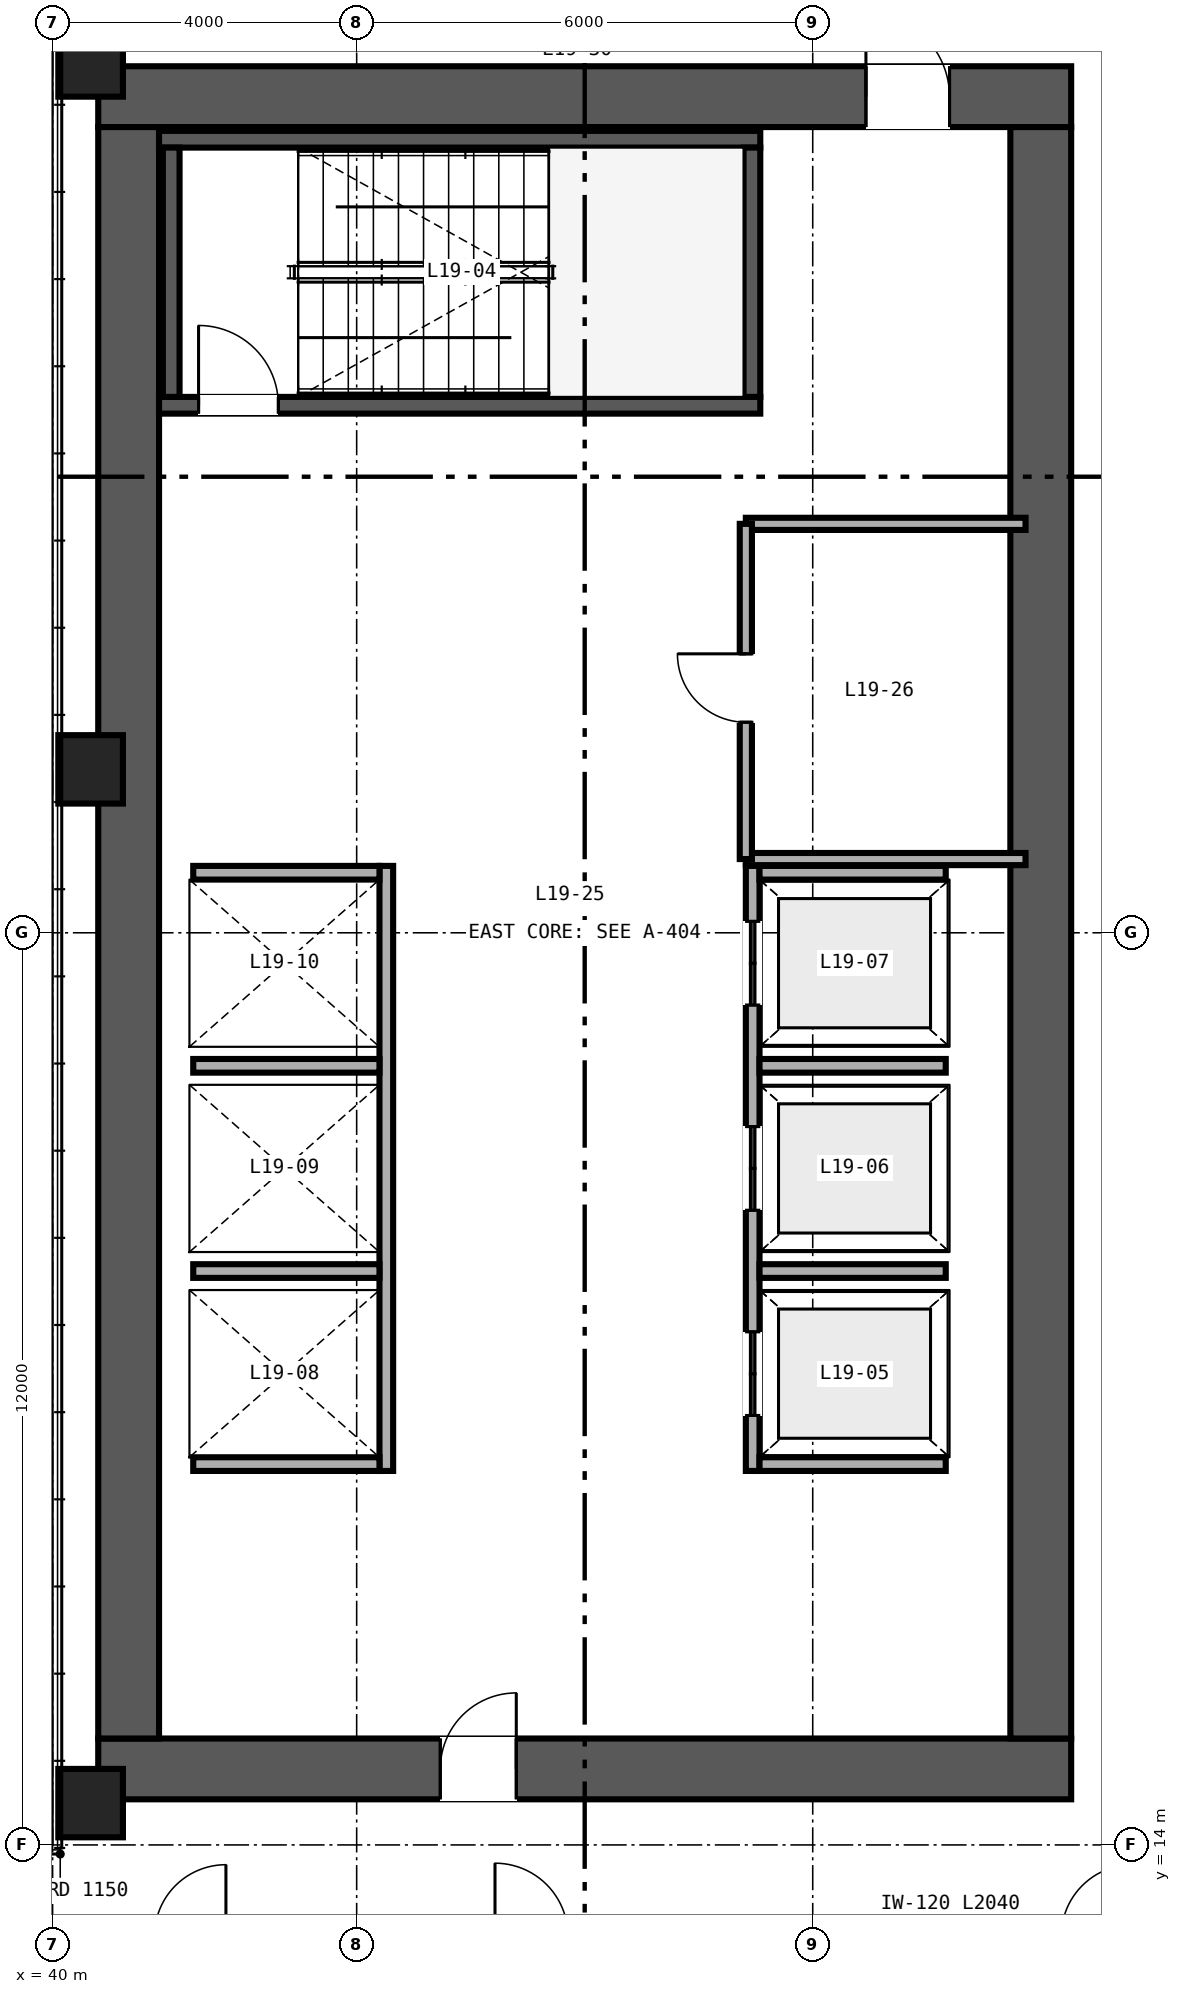
"""IFC4 building model, lengths in metres.
Left out: names, types, materials, properties, quantities, classifications, styles, units other than length and angle.
Written with IfcOpenShell. Run it as: python <this file> out.ifc"""

import sys

from ifc_helpers import new_model, si_unit, direction, frame, frame_2d, origin, origin_2d, place, context, subcontext, project, spatial, rectangle, hollow_rectangle, extrude, source, transform, mapped, element, fill, save


model = new_model("IFC4")
c1 = context("Model", 3, precision=1e-05, world=origin(), true_north=direction((0.0, 1.0)))
c2 = subcontext(c1, "Body", "Model", "MODEL_VIEW")
j1 = project(units=[si_unit("LENGTHUNIT", "METRE"), si_unit("PLANEANGLEUNIT", "RADIAN")], contexts=[c1])
p1 = place(None, origin())
s1 = spatial("IfcSite", under=j1, at=p1, CompositionType="ELEMENT")
p2 = place(p1, origin())
s2 = spatial("IfcBuilding", under=s1, at=p2, CompositionType="ELEMENT")
p3 = place(p2, frame((0.0, 0.0, 78.0)))
s3 = spatial("IfcBuildingStorey", under=s2, at=p3, CompositionType="ELEMENT", Elevation=78.0)
p4 = place(p3, frame((40.6, 15.0, 0.0), z_axis=(0.0, 0.0, 1.0), x_axis=(1.0, 0.0, 0.0)))
e1 = element("IfcWall", 1, at=p4, inside=s3, PredefinedType="SHEAR", context=c2, shape_type="SweptSolid", body=[
    extrude(rectangle(XDim=12.8, YDim=0.8, at=frame_2d((6.4, 0.0))), origin(), (0.0, 0.0, 1.0), 3.35),
])
p5 = place(p4, frame((4.5, 0.0, 0.0)))
e2 = element("IfcOpeningElement", 2, at=p5, cuts=e1, PredefinedType="OPENING", context=c2, shape_type="SweptSolid", body=[
    extrude(rectangle(XDim=1.0, YDim=2.15, at=frame_2d((0.5, 1.075))), frame((0.0, 0.41, 0.0), z_axis=(0.0, -1.0, 0.0), x_axis=(1.0, 0.0, 0.0)), (0.0, 0.0, 1.0), 0.82),
])
p6 = place(p3, frame((40.6, 37.0, 0.0), z_axis=(0.0, 0.0, 1.0), x_axis=(1.0, 0.0, 0.0)))
e3 = element("IfcWall", 3, at=p6, inside=s3, PredefinedType="SHEAR", context=c2, shape_type="SweptSolid", body=[
    extrude(rectangle(XDim=12.8, YDim=0.8, at=frame_2d((6.4, 0.0))), origin(), (0.0, 0.0, 1.0), 3.35),
])
p7 = place(p6, frame((10.1, 0.0, 0.0)))
e4 = element("IfcOpeningElement", 4, at=p7, cuts=e3, PredefinedType="OPENING", context=c2, shape_type="SweptSolid", body=[
    extrude(rectangle(XDim=1.1, YDim=2.15, at=frame_2d((0.55, 1.075))), frame((0.0, 0.41, 0.0), z_axis=(0.0, -1.0, 0.0), x_axis=(1.0, 0.0, 0.0)), (0.0, 0.0, 1.0), 0.82),
])
for number, where, z_axis, x_axis in (
    (5, (41.0, 15.4, 0.0), (0.0, 0.0, 1.0), (0.0, 1.0, 0.0)),
    (6, (53.0, 15.4, 0.0), (0.0, 0.0, 1.0), (0.0, 1.0, 0.0)),
):
    element("IfcWall", number, at=place(p3, frame(where, z_axis=z_axis, x_axis=x_axis)), inside=s3, PredefinedType="SHEAR", context=c2, shape_type="SweptSolid", body=[
        extrude(rectangle(XDim=21.2, YDim=0.8, at=frame_2d((10.6, 0.0))), origin(), (0.0, 0.0, 1.0), 3.35),
    ])
p8 = place(p3, frame((41.4, 32.94, 0.0), z_axis=(0.0, 0.0, 1.0), x_axis=(1.0, 0.0, 0.0)))
e7 = element("IfcWall", 7, at=p8, inside=s3, PredefinedType="SHEAR", context=c2, shape_type="SweptSolid", body=[
    extrude(rectangle(XDim=7.91, YDim=0.22, at=frame_2d((3.955, 0.0))), origin(), (0.0, 0.0, 1.0), 3.4),
])
p9 = place(p8, frame((0.52, 0.0, 0.0)))
e8 = element("IfcOpeningElement", 8, at=p9, cuts=e7, PredefinedType="OPENING", context=c2, shape_type="SweptSolid", body=[
    extrude(rectangle(XDim=1.05, YDim=2.15, at=frame_2d((0.525, 1.075))), frame((0.0, 0.12, 0.0), z_axis=(0.0, -1.0, 0.0), x_axis=(1.0, 0.0, 0.0)), (0.0, 0.0, 1.0), 0.24),
])
p10 = place(p3, frame((41.4, 36.44, 0.0), z_axis=(0.0, 0.0, 1.0), x_axis=(1.0, 0.0, 0.0)))
e9 = element("IfcWall", 9, at=p10, inside=s3, PredefinedType="SHEAR", context=c2, shape_type="SweptSolid", body=[
    extrude(rectangle(XDim=7.91, YDim=0.22, at=frame_2d((3.955, 0.0))), origin(), (0.0, 0.0, 1.0), 3.4),
])
for number, where, z_axis, x_axis in (
    (10, (41.56, 33.05, 0.0), (0.0, 0.0, 1.0), (0.0, 1.0, 0.0)),
    (11, (49.2, 33.05, 0.0), (0.0, 0.0, 1.0), (0.0, 1.0, 0.0)),
):
    element("IfcWall", number, at=place(p3, frame(where, z_axis=z_axis, x_axis=x_axis)), inside=s3, PredefinedType="SHEAR", context=c2, shape_type="SweptSolid", body=[
        extrude(rectangle(XDim=3.28, YDim=0.22, at=frame_2d((1.64, 0.0))), origin(), (0.0, 0.0, 1.0), 3.4),
    ])
m1 = source(origin(), c2, "Body", "SweptSolid", [
    extrude(hollow_rectangle(XDim=0.85, YDim=0.9, WallThickness=0.04, at=origin_2d()), origin(), (0.0, 0.0, 1.0), 3.35),
])
for number, where, z_axis, x_axis in (
    (12, (40.5, 14.55, 0.0), (0.0, 0.0, 1.0), (1.0, 0.0, 0.0)),
    (13, (40.5, 28.15, 0.0), (0.0, 0.0, 1.0), (1.0, 0.0, 0.0)),
    (14, (40.5, 37.45, 0.0), (0.0, 0.0, 1.0), (1.0, 0.0, 0.0)),
):
    element("IfcColumn", number, at=place(p3, frame(where, z_axis=z_axis, x_axis=x_axis)), inside=s3, PredefinedType="COLUMN", context=c2, shape_type="MappedRepresentation", body=[
        mapped(m1, transform((0.0, 0.0, 0.0), scale=1.0)),
    ])
p11 = place(p3, frame((49.21, 18.92, 0.0), z_axis=(0.0, 0.0, 1.0), x_axis=(0.0, 1.0, 0.0)))
e15 = element("IfcWall", 15, at=p11, inside=s3, PredefinedType="SOLIDWALL", context=c2, shape_type="SweptSolid", body=[
    extrude(rectangle(XDim=7.96, YDim=0.18, at=frame_2d((3.98, 0.0))), origin(), (0.0, 0.0, 1.0), 3.35),
])
p12 = place(p11, frame((0.73, 0.0, 0.0)))
e16 = element("IfcOpeningElement", 16, at=p12, cuts=e15, PredefinedType="OPENING", context=c2, shape_type="SweptSolid", body=[
    extrude(rectangle(XDim=1.1, YDim=2.2, at=frame_2d((0.55, 1.1))), frame((0.0, 0.1, 0.0), z_axis=(0.0, -1.0, 0.0), x_axis=(1.0, 0.0, 0.0)), (0.0, 0.0, 1.0), 0.2),
])
p13 = place(p11, frame((3.43, 0.0, 0.0)))
e17 = element("IfcOpeningElement", 17, at=p13, cuts=e15, PredefinedType="OPENING", context=c2, shape_type="SweptSolid", body=[
    extrude(rectangle(XDim=1.1, YDim=2.2, at=frame_2d((0.55, 1.1))), frame((0.0, 0.1, 0.0), z_axis=(0.0, -1.0, 0.0), x_axis=(1.0, 0.0, 0.0)), (0.0, 0.0, 1.0), 0.2),
])
p14 = place(p11, frame((6.13, 0.0, 0.0)))
e18 = element("IfcOpeningElement", 18, at=p14, cuts=e15, PredefinedType="OPENING", context=c2, shape_type="SweptSolid", body=[
    extrude(rectangle(XDim=1.1, YDim=2.2, at=frame_2d((0.55, 1.1))), frame((0.0, 0.1, 0.0), z_axis=(0.0, -1.0, 0.0), x_axis=(1.0, 0.0, 0.0)), (0.0, 0.0, 1.0), 0.2),
])
for number, where, z_axis, x_axis in (
    (19, (49.3, 19.01, 0.0), (0.0, 0.0, 1.0), (1.0, 0.0, 0.0)),
    (20, (49.3, 26.79, 0.0), (0.0, 0.0, 1.0), (1.0, 0.0, 0.0)),
    (21, (49.3, 21.55, 0.0), (0.0, 0.0, 1.0), (1.0, 0.0, 0.0)),
    (22, (49.3, 24.25, 0.0), (0.0, 0.0, 1.0), (1.0, 0.0, 0.0)),
):
    element("IfcWall", number, at=place(p3, frame(where, z_axis=z_axis, x_axis=x_axis)), inside=s3, PredefinedType="SOLIDWALL", context=c2, shape_type="SweptSolid", body=[
        extrude(rectangle(XDim=2.45, YDim=0.18, at=frame_2d((1.225, 0.0))), origin(), (0.0, 0.0, 1.0), 3.35),
    ])
p15 = place(p3, frame((44.39, 18.92, 0.0), z_axis=(0.0, 0.0, 1.0), x_axis=(0.0, 1.0, 0.0)))
e23 = element("IfcWall", 23, at=p15, inside=s3, PredefinedType="SOLIDWALL", context=c2, shape_type="SweptSolid", body=[
    extrude(rectangle(XDim=7.96, YDim=0.18, at=frame_2d((3.98, 0.0))), origin(), (0.0, 0.0, 1.0), 3.35),
])
for number, where, z_axis, x_axis in (
    (24, (41.85, 19.01, 0.0), (0.0, 0.0, 1.0), (1.0, 0.0, 0.0)),
    (25, (41.85, 26.79, 0.0), (0.0, 0.0, 1.0), (1.0, 0.0, 0.0)),
    (26, (41.85, 21.55, 0.0), (0.0, 0.0, 1.0), (1.0, 0.0, 0.0)),
    (27, (41.85, 24.25, 0.0), (0.0, 0.0, 1.0), (1.0, 0.0, 0.0)),
):
    element("IfcWall", number, at=place(p3, frame(where, z_axis=z_axis, x_axis=x_axis)), inside=s3, PredefinedType="SOLIDWALL", context=c2, shape_type="SweptSolid", body=[
        extrude(rectangle(XDim=2.45, YDim=0.18, at=frame_2d((1.225, 0.0))), origin(), (0.0, 0.0, 1.0), 3.35),
    ])
p16 = place(p3, frame((49.12, 26.97, 0.0), z_axis=(0.0, 0.0, 1.0), x_axis=(1.0, 0.0, 0.0)))
e28 = element("IfcWall", 28, at=p16, inside=s3, PredefinedType="PARTITIONING", context=c2, shape_type="SweptSolid", body=[
    extrude(rectangle(XDim=3.68, YDim=0.16, at=frame_2d((1.84, 0.0))), origin(), (0.0, 0.0, 1.0), 3.35),
])
p17 = place(p3, frame((49.12, 31.38, 0.0), z_axis=(0.0, 0.0, 1.0), x_axis=(1.0, 0.0, 0.0)))
e29 = element("IfcWall", 29, at=p17, inside=s3, PredefinedType="PARTITIONING", context=c2, shape_type="SweptSolid", body=[
    extrude(rectangle(XDim=3.68, YDim=0.16, at=frame_2d((1.84, 0.0))), origin(), (0.0, 0.0, 1.0), 2.36),
])
p18 = place(p3, frame((49.12, 26.97, 0.0), z_axis=(0.0, 0.0, 1.0), x_axis=(0.0, 1.0, 0.0)))
e30 = element("IfcWall", 30, at=p18, inside=s3, PredefinedType="PARTITIONING", context=c2, shape_type="SweptSolid", body=[
    extrude(rectangle(XDim=4.41, YDim=0.16, at=frame_2d((2.205, 0.0))), origin(), (0.0, 0.0, 1.0), 2.36),
])
p19 = place(p18, frame((1.8, 0.0, 0.0)))
e31 = element("IfcOpeningElement", 31, at=p19, cuts=e30, PredefinedType="OPENING", context=c2, shape_type="SweptSolid", body=[
    extrude(rectangle(XDim=0.9, YDim=2.15, at=frame_2d((0.45, 1.075))), frame((0.0, 0.09, 0.0), z_axis=(0.0, -1.0, 0.0), x_axis=(1.0, 0.0, 0.0)), (0.0, 0.0, 1.0), 0.18),
])
m2 = source(origin(), c2, "Body", "SweptSolid", [
    extrude(rectangle(XDim=1.05, YDim=2.15, at=frame_2d((0.525, 1.075))), frame((0.0, 0.025, 0.0), z_axis=(0.0, -1.0, 0.0), x_axis=(1.0, 0.0, 0.0)), (0.0, 0.0, 1.0), 0.05),
])
p20 = place(p9, origin())
e32 = element("IfcDoor", 32, at=p20, inside=s3, OperationType="SINGLE_SWING_LEFT", PredefinedType="DOOR", context=c2, shape_type="MappedRepresentation", body=[
    mapped(m2, transform((0.0, 0.0, 0.0), scale=1.0)),
])
fill(e8, e32)
m3 = source(origin(), c2, "Body", "SweptSolid", [
    extrude(rectangle(XDim=1.1, YDim=2.2, at=frame_2d((0.55, 1.1))), frame((0.0, 0.025, 0.0), z_axis=(0.0, -1.0, 0.0), x_axis=(1.0, 0.0, 0.0)), (0.0, 0.0, 1.0), 0.05),
])
p21 = place(p12, origin())
e33 = element("IfcDoor", 33, at=p21, inside=s3, OperationType="DOUBLE_DOOR_SLIDING", PredefinedType="DOOR", context=c2, shape_type="MappedRepresentation", body=[
    mapped(m3, transform((0.0, 0.0, 0.0), scale=1.0)),
])
fill(e16, e33)
p22 = place(p13, origin())
e34 = element("IfcDoor", 34, at=p22, inside=s3, OperationType="DOUBLE_DOOR_SLIDING", PredefinedType="DOOR", context=c2, shape_type="MappedRepresentation", body=[
    mapped(m3, transform((0.0, 0.0, 0.0), scale=1.0)),
])
fill(e17, e34)
p23 = place(p14, origin())
e35 = element("IfcDoor", 35, at=p23, inside=s3, OperationType="DOUBLE_DOOR_SLIDING", PredefinedType="DOOR", context=c2, shape_type="MappedRepresentation", body=[
    mapped(m3, transform((0.0, 0.0, 0.0), scale=1.0)),
])
fill(e18, e35)
m4 = source(origin(), c2, "Body", "SweptSolid", [
    extrude(rectangle(XDim=1.0, YDim=2.15, at=frame_2d((0.5, 1.075))), frame((0.0, 0.025, 0.0), z_axis=(0.0, -1.0, 0.0), x_axis=(1.0, 0.0, 0.0)), (0.0, 0.0, 1.0), 0.05),
])
p24 = place(p5, origin())
e36 = element("IfcDoor", 36, at=p24, inside=s3, OperationType="SINGLE_SWING_RIGHT", PredefinedType="DOOR", context=c2, shape_type="MappedRepresentation", body=[
    mapped(m4, transform((0.0, 0.0, 0.0), scale=1.0)),
])
fill(e2, e36)
m5 = source(origin(), c2, "Body", "SweptSolid", [
    extrude(rectangle(XDim=1.1, YDim=2.15, at=frame_2d((0.55, 1.075))), frame((0.0, 0.025, 0.0), z_axis=(0.0, -1.0, 0.0), x_axis=(1.0, 0.0, 0.0)), (0.0, 0.0, 1.0), 0.05),
])
p25 = place(p7, origin())
e37 = element("IfcDoor", 37, at=p25, inside=s3, OperationType="SINGLE_SWING_LEFT", PredefinedType="DOOR", context=c2, shape_type="MappedRepresentation", body=[
    mapped(m5, transform((0.0, 0.0, 0.0), scale=1.0)),
])
fill(e4, e37)
m6 = source(origin(), c2, "Body", "SweptSolid", [
    extrude(rectangle(XDim=0.9, YDim=2.15, at=frame_2d((0.45, 1.075))), frame((0.0, 0.025, 0.0), z_axis=(0.0, -1.0, 0.0), x_axis=(1.0, 0.0, 0.0)), (0.0, 0.0, 1.0), 0.05),
])
p26 = place(p19, origin())
e38 = element("IfcDoor", 38, at=p26, inside=s3, OperationType="SINGLE_SWING_RIGHT", PredefinedType="DOOR", context=c2, shape_type="MappedRepresentation", body=[
    mapped(m6, transform((0.0, 0.0, 0.0), scale=1.0)),
])
fill(e31, e38)
save(model, sys.argv[1])
